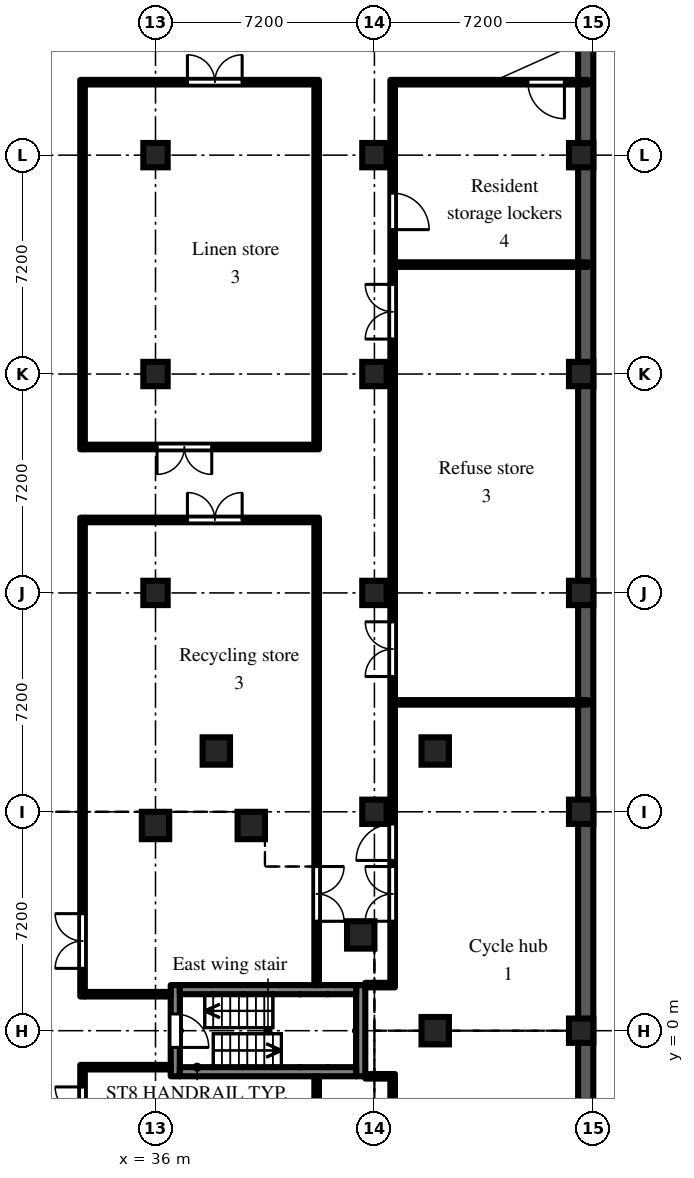
"""IFC4 building model, lengths in metres.
Left out: names, types, materials, properties, quantities, classifications, styles, units other than length and angle.
Written with IfcOpenShell. Run it as: python <this file> out.ifc"""

import sys

from ifc_helpers import new_model, si_unit, direction, frame, frame_2d, origin, origin_2d, place, context, subcontext, project, spatial, rectangle, extrude, element, fill, save


model = new_model("IFC4")
c1 = context("Model", 3, precision=1e-05, world=origin(), true_north=direction((0.0, 1.0)))
c2 = subcontext(c1, "Body", "Model", "MODEL_VIEW")
j1 = project(units=[si_unit("LENGTHUNIT", "METRE"), si_unit("PLANEANGLEUNIT", "RADIAN")], contexts=[c1])
p1 = place(None, origin())
s1 = spatial("IfcSite", under=j1, at=p1, CompositionType="ELEMENT")
p2 = place(p1, origin())
s2 = spatial("IfcBuilding", under=s1, at=p2, CompositionType="ELEMENT")
p3 = place(p2, frame((0.0, 0.0, -4.8)))
s3 = spatial("IfcBuildingStorey", under=s2, at=p3, CompositionType="ELEMENT", Elevation=-4.8)
p4 = place(p3, frame((50.15, -49.9, -0.5), z_axis=(0.0, 0.0, 1.0), x_axis=(0.0, 1.0, 0.0)))
e1 = element("IfcWall", 1, at=p4, inside=s3, PredefinedType="SOLIDWALL", context=c2, shape_type="SweptSolid", body=[
    extrude(rectangle(XDim=99.8, YDim=0.5, at=frame_2d((49.9, 0.0))), origin(), (0.0, 0.0, 1.0), 5.3),
])
for number, where, z_axis, x_axis in (
    (2, (36.0, 6.75, -0.5), (0.0, 0.0, 1.0), (1.0, 0.0, 0.0)),
    (3, (39.15, 6.75, -0.5), (0.0, 0.0, 1.0), (1.0, 0.0, 0.0)),
    (4, (42.75, 3.15, -0.5), (0.0, 0.0, 1.0), (1.0, 0.0, 0.0)),
):
    element("IfcColumn", number, at=place(p3, frame(where, z_axis=z_axis, x_axis=x_axis)), inside=s3, PredefinedType="COLUMN", context=c2, shape_type="SweptSolid", body=[
        extrude(rectangle(XDim=0.9, YDim=0.9, at=origin_2d()), origin(), (0.0, 0.0, 1.0), 5.3),
    ])
for number, where, z_axis, x_axis in (
    (5, (36.0, 14.4, -0.5), (0.0, 0.0, 1.0), (1.0, 0.0, 0.0)),
    (6, (36.0, 21.6, -0.5), (0.0, 0.0, 1.0), (1.0, 0.0, 0.0)),
    (7, (36.0, 28.8, -0.5), (0.0, 0.0, 1.0), (1.0, 0.0, 0.0)),
    (8, (43.2, 7.2, -0.5), (0.0, 0.0, 1.0), (1.0, 0.0, 0.0)),
    (9, (43.2, 14.4, -0.5), (0.0, 0.0, 1.0), (1.0, 0.0, 0.0)),
    (10, (43.2, 21.6, -0.5), (0.0, 0.0, 1.0), (1.0, 0.0, 0.0)),
    (11, (43.2, 28.8, -0.5), (0.0, 0.0, 1.0), (1.0, 0.0, 0.0)),
    (12, (50.0, 0.0, -0.5), (0.0, 0.0, 1.0), (1.0, 0.0, 0.0)),
    (13, (50.0, 7.2, -0.5), (0.0, 0.0, 1.0), (1.0, 0.0, 0.0)),
    (14, (50.0, 14.4, -0.5), (0.0, 0.0, 1.0), (1.0, 0.0, 0.0)),
    (15, (50.0, 21.6, -0.5), (0.0, 0.0, 1.0), (1.0, 0.0, 0.0)),
    (16, (50.0, 28.8, -0.5), (0.0, 0.0, 1.0), (1.0, 0.0, 0.0)),
):
    element("IfcColumn", number, at=place(p3, frame(where, z_axis=z_axis, x_axis=x_axis)), inside=s3, PredefinedType="COLUMN", context=c2, shape_type="SweptSolid", body=[
        extrude(rectangle(XDim=0.8, YDim=0.8, at=origin_2d()), origin(), (0.0, 0.0, 1.0), 5.3),
    ])
for number, where, z_axis, x_axis in (
    (17, (38.0, 9.2, -0.5), (0.0, 0.0, 1.0), (1.0, 0.0, 0.0)),
    (18, (45.2, 0.0, -0.5), (0.0, 0.0, 1.0), (1.0, 0.0, 0.0)),
    (19, (45.2, 9.2, -0.5), (0.0, 0.0, 1.0), (1.0, 0.0, 0.0)),
):
    element("IfcColumn", number, at=place(p3, frame(where, z_axis=z_axis, x_axis=x_axis)), inside=s3, PredefinedType="COLUMN", context=c2, shape_type="SweptSolid", body=[
        extrude(rectangle(XDim=0.9, YDim=0.9, at=origin_2d()), origin(), (0.0, 0.0, 1.0), 5.3),
    ])
p5 = place(p3, frame((36.65, -1.5, 0.0), z_axis=(0.0, 0.0, 1.0), x_axis=(0.0, 1.0, 0.0)))
e20 = element("IfcWall", 20, at=p5, inside=s3, PredefinedType="SHEAR", context=c2, shape_type="SweptSolid", body=[
    extrude(rectangle(XDim=3.0, YDim=0.3, at=frame_2d((1.5, 0.0))), origin(), (0.0, 0.0, 1.0), 4.35),
])
p6 = place(p5, frame((0.95, 0.0, 0.0)))
e21 = element("IfcOpeningElement", 21, at=p6, cuts=e20, PredefinedType="OPENING", context=c2, shape_type="SweptSolid", body=[
    extrude(rectangle(XDim=1.1, YDim=2.1, at=frame_2d((0.55, 1.05))), frame((0.0, 0.16, 0.0), z_axis=(0.0, -1.0, 0.0), x_axis=(1.0, 0.0, 0.0)), (0.0, 0.0, 1.0), 0.32),
])
p7 = place(p3, frame((42.75, -1.5, 0.0), z_axis=(0.0, 0.0, 1.0), x_axis=(0.0, 1.0, 0.0)))
e22 = element("IfcWall", 22, at=p7, inside=s3, PredefinedType="SHEAR", context=c2, shape_type="SweptSolid", body=[
    extrude(rectangle(XDim=3.0, YDim=0.3, at=frame_2d((1.5, 0.0))), origin(), (0.0, 0.0, 1.0), 4.35),
])
for number, where, z_axis, x_axis in (
    (23, (36.8, -1.35, 0.0), (0.0, 0.0, 1.0), (1.0, 0.0, 0.0)),
    (24, (36.8, 1.35, 0.0), (0.0, 0.0, 1.0), (1.0, 0.0, 0.0)),
):
    element("IfcWall", number, at=place(p3, frame(where, z_axis=z_axis, x_axis=x_axis)), inside=s3, PredefinedType="SHEAR", context=c2, shape_type="SweptSolid", body=[
        extrude(rectangle(XDim=5.8, YDim=0.3, at=frame_2d((2.9, 0.0))), origin(), (0.0, 0.0, 1.0), 4.35),
    ])
p8 = place(p3, frame((33.6, -16.875, 0.0), z_axis=(0.0, 0.0, 1.0), x_axis=(0.0, 1.0, 0.0)))
e25 = element("IfcWall", 25, at=p8, inside=s3, PredefinedType="PARTITIONING", context=c2, shape_type="SweptSolid", body=[
    extrude(rectangle(XDim=15.75, YDim=0.15, at=frame_2d((7.875, 0.0))), origin(), (0.0, 0.0, 1.0), 4.35),
])
p9 = place(p8, frame((13.225, 0.0, 0.0)))
e26 = element("IfcOpeningElement", 26, at=p9, cuts=e25, PredefinedType="OPENING", context=c2, shape_type="SweptSolid", body=[
    extrude(rectangle(XDim=1.8, YDim=2.1, at=frame_2d((0.9, 1.05))), frame((0.0, 0.085, 0.0), z_axis=(0.0, -1.0, 0.0), x_axis=(1.0, 0.0, 0.0)), (0.0, 0.0, 1.0), 0.17),
])
p10 = place(p3, frame((33.675, -1.2, 0.0), z_axis=(0.0, 0.0, 1.0), x_axis=(1.0, 0.0, 0.0)))
e27 = element("IfcWall", 27, at=p10, inside=s3, PredefinedType="PARTITIONING", context=c2, shape_type="SweptSolid", body=[
    extrude(rectangle(XDim=2.825, YDim=0.15, at=frame_2d((1.413, 0.0))), origin(), (0.0, 0.0, 1.0), 4.35),
])
p11 = place(p3, frame((33.6, 1.125, 0.0), z_axis=(0.0, 0.0, 1.0), x_axis=(0.0, 1.0, 0.0)))
e28 = element("IfcWall", 28, at=p11, inside=s3, PredefinedType="PARTITIONING", context=c2, shape_type="SweptSolid", body=[
    extrude(rectangle(XDim=15.75, YDim=0.15, at=frame_2d((7.875, 0.0))), origin(), (0.0, 0.0, 1.0), 4.35),
])
p12 = place(p11, frame((0.925, 0.0, 0.0)))
e29 = element("IfcOpeningElement", 29, at=p12, cuts=e28, PredefinedType="OPENING", context=c2, shape_type="SweptSolid", body=[
    extrude(rectangle(XDim=1.8, YDim=2.1, at=frame_2d((0.9, 1.05))), frame((0.0, 0.085, 0.0), z_axis=(0.0, -1.0, 0.0), x_axis=(1.0, 0.0, 0.0)), (0.0, 0.0, 1.0), 0.17),
])
p13 = place(p3, frame((33.675, 1.2, 0.0), z_axis=(0.0, 0.0, 1.0), x_axis=(1.0, 0.0, 0.0)))
e30 = element("IfcWall", 30, at=p13, inside=s3, PredefinedType="PARTITIONING", context=c2, shape_type="SweptSolid", body=[
    extrude(rectangle(XDim=2.825, YDim=0.15, at=frame_2d((1.413, 0.0))), origin(), (0.0, 0.0, 1.0), 4.35),
])
p14 = place(p3, frame((33.675, 16.8, 0.0), z_axis=(0.0, 0.0, 1.0), x_axis=(1.0, 0.0, 0.0)))
e31 = element("IfcWall", 31, at=p14, inside=s3, PredefinedType="PARTITIONING", context=c2, shape_type="SweptSolid", body=[
    extrude(rectangle(XDim=7.7, YDim=0.15, at=frame_2d((3.85, 0.0))), origin(), (0.0, 0.0, 1.0), 4.35),
])
p15 = place(p14, frame((3.375, 0.0, 0.0)))
e32 = element("IfcOpeningElement", 32, at=p15, cuts=e31, PredefinedType="OPENING", context=c2, shape_type="SweptSolid", body=[
    extrude(rectangle(XDim=1.8, YDim=2.1, at=frame_2d((0.9, 1.05))), frame((0.0, 0.085, 0.0), z_axis=(0.0, -1.0, 0.0), x_axis=(1.0, 0.0, 0.0)), (0.0, 0.0, 1.0), 0.17),
])
p16 = place(p3, frame((33.6, 19.125, 0.0), z_axis=(0.0, 0.0, 1.0), x_axis=(0.0, 1.0, 0.0)))
e33 = element("IfcWall", 33, at=p16, inside=s3, PredefinedType="PARTITIONING", context=c2, shape_type="SweptSolid", body=[
    extrude(rectangle(XDim=12.15, YDim=0.15, at=frame_2d((6.075, 0.0))), origin(), (0.0, 0.0, 1.0), 4.35),
])
p17 = place(p3, frame((33.675, 19.2, 0.0), z_axis=(0.0, 0.0, 1.0), x_axis=(1.0, 0.0, 0.0)))
e34 = element("IfcWall", 34, at=p17, inside=s3, PredefinedType="PARTITIONING", context=c2, shape_type="SweptSolid", body=[
    extrude(rectangle(XDim=7.7, YDim=0.15, at=frame_2d((3.85, 0.0))), origin(), (0.0, 0.0, 1.0), 4.35),
])
p18 = place(p17, frame((2.375, 0.0, 0.0)))
e35 = element("IfcOpeningElement", 35, at=p18, cuts=e34, PredefinedType="OPENING", context=c2, shape_type="SweptSolid", body=[
    extrude(rectangle(XDim=1.8, YDim=2.1, at=frame_2d((0.9, 1.05))), frame((0.0, 0.085, 0.0), z_axis=(0.0, -1.0, 0.0), x_axis=(1.0, 0.0, 0.0)), (0.0, 0.0, 1.0), 0.17),
])
p19 = place(p3, frame((33.675, 31.2, 0.0), z_axis=(0.0, 0.0, 1.0), x_axis=(1.0, 0.0, 0.0)))
e36 = element("IfcWall", 36, at=p19, inside=s3, PredefinedType="PARTITIONING", context=c2, shape_type="SweptSolid", body=[
    extrude(rectangle(XDim=7.7, YDim=0.15, at=frame_2d((3.85, 0.0))), origin(), (0.0, 0.0, 1.0), 4.35),
])
p20 = place(p19, frame((3.375, 0.0, 0.0)))
e37 = element("IfcOpeningElement", 37, at=p20, cuts=e36, PredefinedType="OPENING", context=c2, shape_type="SweptSolid", body=[
    extrude(rectangle(XDim=1.8, YDim=2.1, at=frame_2d((0.9, 1.05))), frame((0.0, 0.085, 0.0), z_axis=(0.0, -1.0, 0.0), x_axis=(1.0, 0.0, 0.0)), (0.0, 0.0, 1.0), 0.17),
])
p21 = place(p3, frame((41.3, -16.725, 0.0), z_axis=(0.0, 0.0, 1.0), x_axis=(0.0, 1.0, 0.0)))
e38 = element("IfcWall", 38, at=p21, inside=s3, PredefinedType="PARTITIONING", context=c2, shape_type="SweptSolid", body=[
    extrude(rectangle(XDim=15.225, YDim=0.15, at=frame_2d((7.613, 0.0))), origin(), (0.0, 0.0, 1.0), 4.35),
])
p22 = place(p21, frame((11.325, 0.0, 0.0)))
e39 = element("IfcOpeningElement", 39, at=p22, cuts=e38, PredefinedType="OPENING", context=c2, shape_type="SweptSolid", body=[
    extrude(rectangle(XDim=1.8, YDim=2.1, at=frame_2d((0.9, 1.05))), frame((0.0, 0.085, 0.0), z_axis=(0.0, -1.0, 0.0), x_axis=(1.0, 0.0, 0.0)), (0.0, 0.0, 1.0), 0.17),
])
p23 = place(p3, frame((41.3, 1.5, 0.0), z_axis=(0.0, 0.0, 1.0), x_axis=(0.0, 1.0, 0.0)))
e40 = element("IfcWall", 40, at=p23, inside=s3, PredefinedType="PARTITIONING", context=c2, shape_type="SweptSolid", body=[
    extrude(rectangle(XDim=15.225, YDim=0.15, at=frame_2d((7.613, 0.0))), origin(), (0.0, 0.0, 1.0), 4.35),
])
p24 = place(p23, frame((2.1, 0.0, 0.0)))
e41 = element("IfcOpeningElement", 41, at=p24, cuts=e40, PredefinedType="OPENING", context=c2, shape_type="SweptSolid", body=[
    extrude(rectangle(XDim=1.8, YDim=2.1, at=frame_2d((0.9, 1.05))), frame((0.0, 0.085, 0.0), z_axis=(0.0, -1.0, 0.0), x_axis=(1.0, 0.0, 0.0)), (0.0, 0.0, 1.0), 0.17),
])
p25 = place(p3, frame((41.3, 19.275, 0.0), z_axis=(0.0, 0.0, 1.0), x_axis=(0.0, 1.0, 0.0)))
e42 = element("IfcWall", 42, at=p25, inside=s3, PredefinedType="PARTITIONING", context=c2, shape_type="SweptSolid", body=[
    extrude(rectangle(XDim=11.85, YDim=0.15, at=frame_2d((5.925, 0.0))), origin(), (0.0, 0.0, 1.0), 4.35),
])
for number, where, z_axis, x_axis in (
    (43, (42.9, -1.5, 0.0), (0.0, 0.0, 1.0), (1.0, 0.0, 0.0)),
    (44, (42.9, 1.5, 0.0), (0.0, 0.0, 1.0), (1.0, 0.0, 0.0)),
):
    element("IfcWall", number, at=place(p3, frame(where, z_axis=z_axis, x_axis=x_axis)), inside=s3, PredefinedType="PARTITIONING", context=c2, shape_type="SweptSolid", body=[
        extrude(rectangle(XDim=0.975, YDim=0.15, at=frame_2d((0.488, 0.0))), origin(), (0.0, 0.0, 1.0), 4.35),
    ])
p26 = place(p3, frame((43.8, -31.275, 0.0), z_axis=(0.0, 0.0, 1.0), x_axis=(0.0, 1.0, 0.0)))
e45 = element("IfcWall", 45, at=p26, inside=s3, PredefinedType="PARTITIONING", context=c2, shape_type="SweptSolid", body=[
    extrude(rectangle(XDim=29.7, YDim=0.15, at=frame_2d((14.85, 0.0))), origin(), (0.0, 0.0, 1.0), 4.35),
])
p27 = place(p26, frame((3.625, 0.0, 0.0)))
e46 = element("IfcOpeningElement", 46, at=p27, cuts=e45, PredefinedType="OPENING", context=c2, shape_type="SweptSolid", body=[
    extrude(rectangle(XDim=1.8, YDim=2.1, at=frame_2d((0.9, 1.05))), frame((0.0, 0.085, 0.0), z_axis=(0.0, -1.0, 0.0), x_axis=(1.0, 0.0, 0.0)), (0.0, 0.0, 1.0), 0.17),
])
p28 = place(p26, frame((24.475, 0.0, 0.0)))
e47 = element("IfcOpeningElement", 47, at=p28, cuts=e45, PredefinedType="OPENING", context=c2, shape_type="SweptSolid", body=[
    extrude(rectangle(XDim=1.2, YDim=2.1, at=frame_2d((0.6, 1.05))), frame((0.0, 0.085, 0.0), z_axis=(0.0, -1.0, 0.0), x_axis=(1.0, 0.0, 0.0)), (0.0, 0.0, 1.0), 0.17),
])
p29 = place(p26, frame((25.875, 0.0, 0.0)))
e48 = element("IfcOpeningElement", 48, at=p29, cuts=e45, PredefinedType="OPENING", context=c2, shape_type="SweptSolid", body=[
    extrude(rectangle(XDim=1.8, YDim=2.1, at=frame_2d((0.9, 1.05))), frame((0.0, 0.085, 0.0), z_axis=(0.0, -1.0, 0.0), x_axis=(1.0, 0.0, 0.0)), (0.0, 0.0, 1.0), 0.17),
])
p30 = place(p26, frame((6.925, 0.0, 0.0)))
e49 = element("IfcOpeningElement", 49, at=p30, cuts=e45, PredefinedType="OPENING", context=c2, shape_type="SweptSolid", body=[
    extrude(rectangle(XDim=1.8, YDim=2.1, at=frame_2d((0.9, 1.05))), frame((0.0, 0.085, 0.0), z_axis=(0.0, -1.0, 0.0), x_axis=(1.0, 0.0, 0.0)), (0.0, 0.0, 1.0), 0.17),
])
p31 = place(p26, frame((18.025, 0.0, 0.0)))
e50 = element("IfcOpeningElement", 50, at=p31, cuts=e45, PredefinedType="OPENING", context=c2, shape_type="SweptSolid", body=[
    extrude(rectangle(XDim=1.8, YDim=2.1, at=frame_2d((0.9, 1.05))), frame((0.0, 0.085, 0.0), z_axis=(0.0, -1.0, 0.0), x_axis=(1.0, 0.0, 0.0)), (0.0, 0.0, 1.0), 0.17),
])
p32 = place(p3, frame((43.8, 1.575, 0.0), z_axis=(0.0, 0.0, 1.0), x_axis=(0.0, 1.0, 0.0)))
e51 = element("IfcWall", 51, at=p32, inside=s3, PredefinedType="PARTITIONING", context=c2, shape_type="SweptSolid", body=[
    extrude(rectangle(XDim=29.7, YDim=0.15, at=frame_2d((14.85, 0.0))), origin(), (0.0, 0.0, 1.0), 4.35),
])
p33 = place(p32, frame((24.775, 0.0, 0.0)))
e52 = element("IfcOpeningElement", 52, at=p33, cuts=e51, PredefinedType="OPENING", context=c2, shape_type="SweptSolid", body=[
    extrude(rectangle(XDim=1.2, YDim=2.1, at=frame_2d((0.6, 1.05))), frame((0.0, 0.085, 0.0), z_axis=(0.0, -1.0, 0.0), x_axis=(1.0, 0.0, 0.0)), (0.0, 0.0, 1.0), 0.17),
])
p34 = place(p32, frame((10.075, 0.0, 0.0)))
e53 = element("IfcOpeningElement", 53, at=p34, cuts=e51, PredefinedType="OPENING", context=c2, shape_type="SweptSolid", body=[
    extrude(rectangle(XDim=1.8, YDim=2.1, at=frame_2d((0.9, 1.05))), frame((0.0, 0.085, 0.0), z_axis=(0.0, -1.0, 0.0), x_axis=(1.0, 0.0, 0.0)), (0.0, 0.0, 1.0), 0.17),
])
p35 = place(p32, frame((21.175, 0.0, 0.0)))
e54 = element("IfcOpeningElement", 54, at=p35, cuts=e51, PredefinedType="OPENING", context=c2, shape_type="SweptSolid", body=[
    extrude(rectangle(XDim=1.8, YDim=2.1, at=frame_2d((0.9, 1.05))), frame((0.0, 0.085, 0.0), z_axis=(0.0, -1.0, 0.0), x_axis=(1.0, 0.0, 0.0)), (0.0, 0.0, 1.0), 0.17),
])
p36 = place(p32, frame((2.025, 0.0, 0.0)))
e55 = element("IfcOpeningElement", 55, at=p36, cuts=e51, PredefinedType="OPENING", context=c2, shape_type="SweptSolid", body=[
    extrude(rectangle(XDim=1.8, YDim=2.1, at=frame_2d((0.9, 1.05))), frame((0.0, 0.085, 0.0), z_axis=(0.0, -1.0, 0.0), x_axis=(1.0, 0.0, 0.0)), (0.0, 0.0, 1.0), 0.17),
])
p37 = place(p32, frame((4.025, 0.0, 0.0)))
e56 = element("IfcOpeningElement", 56, at=p37, cuts=e51, PredefinedType="OPENING", context=c2, shape_type="SweptSolid", body=[
    extrude(rectangle(XDim=1.2, YDim=2.1, at=frame_2d((0.6, 1.05))), frame((0.0, 0.085, 0.0), z_axis=(0.0, -1.0, 0.0), x_axis=(1.0, 0.0, 0.0)), (0.0, 0.0, 1.0), 0.17),
])
for number, where, z_axis, x_axis in (
    (57, (43.875, 10.8, 0.0), (0.0, 0.0, 1.0), (1.0, 0.0, 0.0)),
    (58, (43.875, 25.2, 0.0), (0.0, 0.0, 1.0), (1.0, 0.0, 0.0)),
):
    element("IfcWall", number, at=place(p3, frame(where, z_axis=z_axis, x_axis=x_axis)), inside=s3, PredefinedType="PARTITIONING", context=c2, shape_type="SweptSolid", body=[
        extrude(rectangle(XDim=6.345, YDim=0.15, at=frame_2d((3.172, 0.0))), origin(), (0.0, 0.0, 1.0), 4.35),
    ])
p38 = place(p3, frame((43.875, 31.2, 0.0), z_axis=(0.0, 0.0, 1.0), x_axis=(1.0, 0.0, 0.0)))
e59 = element("IfcWall", 59, at=p38, inside=s3, PredefinedType="PARTITIONING", context=c2, shape_type="SweptSolid", body=[
    extrude(rectangle(XDim=6.345, YDim=0.15, at=frame_2d((3.172, 0.0))), origin(), (0.0, 0.0, 1.0), 4.35),
])
p39 = place(p38, frame((4.375, 0.0, 0.0)))
e60 = element("IfcOpeningElement", 60, at=p39, cuts=e59, PredefinedType="OPENING", context=c2, shape_type="SweptSolid", body=[
    extrude(rectangle(XDim=1.2, YDim=2.1, at=frame_2d((0.6, 1.05))), frame((0.0, 0.085, 0.0), z_axis=(0.0, -1.0, 0.0), x_axis=(1.0, 0.0, 0.0)), (0.0, 0.0, 1.0), 0.17),
])
p40 = place(p6, frame((1.1, 0.0, 0.0), z_axis=(0.0, 0.0, 1.0), x_axis=(-1.0, 0.0, 0.0)))
e61 = element("IfcDoor", 61, at=p40, inside=s3, OperationType="SINGLE_SWING_RIGHT", PredefinedType="DOOR", context=c2, shape_type="SweptSolid", body=[
    extrude(rectangle(XDim=1.1, YDim=2.1, at=frame_2d((0.55, 1.05))), frame((0.0, 0.025, 0.0), z_axis=(0.0, -1.0, 0.0), x_axis=(1.0, 0.0, 0.0)), (0.0, 0.0, 1.0), 0.05),
])
fill(e21, e61)
p41 = place(p33, frame((1.2, 0.0, 0.0), z_axis=(0.0, 0.0, 1.0), x_axis=(-1.0, 0.0, 0.0)))
e62 = element("IfcDoor", 62, at=p41, inside=s3, OperationType="SINGLE_SWING_RIGHT", PredefinedType="DOOR", context=c2, shape_type="SweptSolid", body=[
    extrude(rectangle(XDim=1.2, YDim=2.1, at=frame_2d((0.6, 1.05))), frame((0.0, 0.025, 0.0), z_axis=(0.0, -1.0, 0.0), x_axis=(1.0, 0.0, 0.0)), (0.0, 0.0, 1.0), 0.05),
])
fill(e52, e62)
p42 = place(p39, frame((1.2, 0.0, 0.0), z_axis=(0.0, 0.0, 1.0), x_axis=(-1.0, 0.0, 0.0)))
e63 = element("IfcDoor", 63, at=p42, inside=s3, OperationType="SINGLE_SWING_LEFT", PredefinedType="DOOR", context=c2, shape_type="SweptSolid", body=[
    extrude(rectangle(XDim=1.2, YDim=2.1, at=frame_2d((0.6, 1.05))), frame((0.0, 0.025, 0.0), z_axis=(0.0, -1.0, 0.0), x_axis=(1.0, 0.0, 0.0)), (0.0, 0.0, 1.0), 0.05),
])
fill(e60, e63)
p43 = place(p18, frame((1.8, 0.0, 0.0), z_axis=(0.0, 0.0, 1.0), x_axis=(-1.0, 0.0, 0.0)))
e64 = element("IfcDoor", 64, at=p43, inside=s3, OperationType="DOUBLE_DOOR_DOUBLE_SWING", PredefinedType="DOOR", context=c2, shape_type="SweptSolid", body=[
    extrude(rectangle(XDim=1.8, YDim=2.1, at=frame_2d((0.9, 1.05))), frame((0.0, 0.025, 0.0), z_axis=(0.0, -1.0, 0.0), x_axis=(1.0, 0.0, 0.0)), (0.0, 0.0, 1.0), 0.05),
])
fill(e35, e64)
p44 = place(p20, origin())
e65 = element("IfcDoor", 65, at=p44, inside=s3, OperationType="DOUBLE_DOOR_DOUBLE_SWING", PredefinedType="DOOR", context=c2, shape_type="SweptSolid", body=[
    extrude(rectangle(XDim=1.8, YDim=2.1, at=frame_2d((0.9, 1.05))), frame((0.0, 0.025, 0.0), z_axis=(0.0, -1.0, 0.0), x_axis=(1.0, 0.0, 0.0)), (0.0, 0.0, 1.0), 0.05),
])
fill(e37, e65)
p45 = place(p34, origin())
e66 = element("IfcDoor", 66, at=p45, inside=s3, OperationType="DOUBLE_DOOR_DOUBLE_SWING", PredefinedType="DOOR", context=c2, shape_type="SweptSolid", body=[
    extrude(rectangle(XDim=1.8, YDim=2.1, at=frame_2d((0.9, 1.05))), frame((0.0, 0.025, 0.0), z_axis=(0.0, -1.0, 0.0), x_axis=(1.0, 0.0, 0.0)), (0.0, 0.0, 1.0), 0.05),
])
fill(e53, e66)
p46 = place(p35, origin())
e67 = element("IfcDoor", 67, at=p46, inside=s3, OperationType="DOUBLE_DOOR_DOUBLE_SWING", PredefinedType="DOOR", context=c2, shape_type="SweptSolid", body=[
    extrude(rectangle(XDim=1.8, YDim=2.1, at=frame_2d((0.9, 1.05))), frame((0.0, 0.025, 0.0), z_axis=(0.0, -1.0, 0.0), x_axis=(1.0, 0.0, 0.0)), (0.0, 0.0, 1.0), 0.05),
])
fill(e54, e67)
p47 = place(p12, origin())
e68 = element("IfcDoor", 68, at=p47, inside=s3, OperationType="DOUBLE_DOOR_DOUBLE_SWING", PredefinedType="DOOR", context=c2, shape_type="SweptSolid", body=[
    extrude(rectangle(XDim=1.8, YDim=2.1, at=frame_2d((0.9, 1.05))), frame((0.0, 0.025, 0.0), z_axis=(0.0, -1.0, 0.0), x_axis=(1.0, 0.0, 0.0)), (0.0, 0.0, 1.0), 0.05),
])
fill(e29, e68)
p48 = place(p15, origin())
e69 = element("IfcDoor", 69, at=p48, inside=s3, OperationType="DOUBLE_DOOR_DOUBLE_SWING", PredefinedType="DOOR", context=c2, shape_type="SweptSolid", body=[
    extrude(rectangle(XDim=1.8, YDim=2.1, at=frame_2d((0.9, 1.05))), frame((0.0, 0.025, 0.0), z_axis=(0.0, -1.0, 0.0), x_axis=(1.0, 0.0, 0.0)), (0.0, 0.0, 1.0), 0.05),
])
fill(e32, e69)
p49 = place(p24, frame((1.8, 0.0, 0.0), z_axis=(0.0, 0.0, 1.0), x_axis=(-1.0, 0.0, 0.0)))
e70 = element("IfcDoor", 70, at=p49, inside=s3, OperationType="DOUBLE_DOOR_DOUBLE_SWING", PredefinedType="DOOR", context=c2, shape_type="SweptSolid", body=[
    extrude(rectangle(XDim=1.8, YDim=2.1, at=frame_2d((0.9, 1.05))), frame((0.0, 0.025, 0.0), z_axis=(0.0, -1.0, 0.0), x_axis=(1.0, 0.0, 0.0)), (0.0, 0.0, 1.0), 0.05),
])
fill(e41, e70)
p50 = place(p36, origin())
e71 = element("IfcDoor", 71, at=p50, inside=s3, OperationType="DOUBLE_DOOR_DOUBLE_SWING", PredefinedType="DOOR", context=c2, shape_type="SweptSolid", body=[
    extrude(rectangle(XDim=1.8, YDim=2.1, at=frame_2d((0.9, 1.05))), frame((0.0, 0.025, 0.0), z_axis=(0.0, -1.0, 0.0), x_axis=(1.0, 0.0, 0.0)), (0.0, 0.0, 1.0), 0.05),
])
fill(e55, e71)
p51 = place(p37, origin())
e72 = element("IfcDoor", 72, at=p51, inside=s3, OperationType="SINGLE_SWING_LEFT", PredefinedType="DOOR", context=c2, shape_type="SweptSolid", body=[
    extrude(rectangle(XDim=1.2, YDim=2.1, at=frame_2d((0.6, 1.05))), frame((0.0, 0.025, 0.0), z_axis=(0.0, -1.0, 0.0), x_axis=(1.0, 0.0, 0.0)), (0.0, 0.0, 1.0), 0.05),
])
fill(e56, e72)
p52 = place(p9, origin())
e73 = element("IfcDoor", 73, at=p52, inside=s3, OperationType="DOUBLE_DOOR_DOUBLE_SWING", PredefinedType="DOOR", context=c2, shape_type="SweptSolid", body=[
    extrude(rectangle(XDim=1.8, YDim=2.1, at=frame_2d((0.9, 1.05))), frame((0.0, 0.025, 0.0), z_axis=(0.0, -1.0, 0.0), x_axis=(1.0, 0.0, 0.0)), (0.0, 0.0, 1.0), 0.05),
])
fill(e26, e73)
save(model, sys.argv[1])
